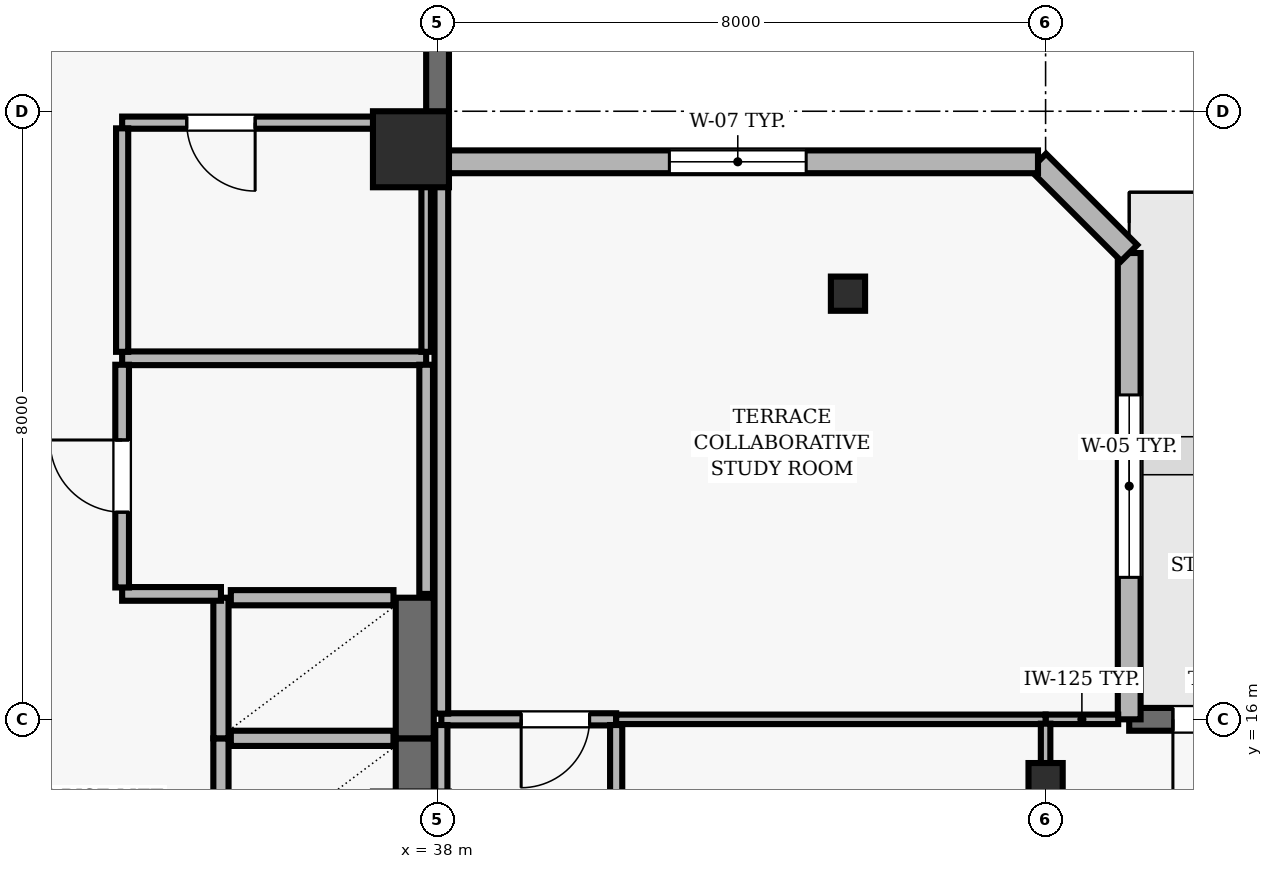
"""IFC4 building model, lengths in metres.
Left out: names, types, materials, properties, quantities, classifications, styles, units other than length and angle.
Written with IfcOpenShell. Run it as: python <this file> out.ifc"""

import sys

from ifc_helpers import new_model, si_unit, direction, frame, frame_2d, origin, origin_2d, place, context, subcontext, project, spatial, rectangle, hollow_rectangle, extrude, element, fill, save


model = new_model("IFC4")
c1 = context("Model", 3, precision=1e-05, world=origin(), true_north=direction((0.0, 1.0)))
c2 = subcontext(c1, "Body", "Model", "MODEL_VIEW")
j1 = project(units=[si_unit("LENGTHUNIT", "METRE"), si_unit("PLANEANGLEUNIT", "RADIAN")], contexts=[c1])
p1 = place(None, origin())
s1 = spatial("IfcSite", under=j1, at=p1, CompositionType="ELEMENT")
p2 = place(p1, origin())
s2 = spatial("IfcBuilding", under=s1, at=p2, CompositionType="ELEMENT")
p3 = place(p2, frame((0.0, 0.0, 195.3)))
s3 = spatial("IfcBuildingStorey", under=s2, at=p3, CompositionType="ELEMENT", Elevation=195.3)
p4 = place(p3, frame((37.65, 23.5, 0.0), z_axis=(0.0, 0.0, 1.0), x_axis=(1.0, 0.0, 0.0)))
e1 = element("IfcColumn", 1, at=p4, inside=s3, PredefinedType="COLUMN", context=c2, shape_type="SweptSolid", body=[
    extrude(rectangle(XDim=1.0, YDim=1.0, at=origin_2d()), origin(), (0.0, 0.0, 1.0), 3.9),
])
for number, where, z_axis, x_axis in (
    (2, (46.0, 15.2, 0.0), (0.0, 0.0, 1.0), (1.0, 0.0, 0.0)),
    (3, (43.4, 21.6, 0.0), (0.0, 0.0, 1.0), (1.0, 0.0, 0.0)),
):
    element("IfcColumn", number, at=place(p3, frame(where, z_axis=z_axis, x_axis=x_axis)), inside=s3, PredefinedType="COLUMN", context=c2, shape_type="SweptSolid", body=[
        extrude(hollow_rectangle(XDim=0.45, YDim=0.45, WallThickness=0.02, at=origin_2d()), origin(), (0.0, 0.0, 1.0), 3.9),
    ])
p5 = place(p3, frame((62.7, 16.0, 0.0), z_axis=(0.0, 0.0, 1.0), x_axis=(-1.0, 0.0, 0.0)))
e4 = element("IfcWall", 4, at=p5, inside=s3, PredefinedType="SOLIDWALL", context=c2, shape_type="SweptSolid", body=[
    extrude(rectangle(XDim=15.6, YDim=0.3, at=frame_2d((7.8, 0.0))), origin(), (0.0, 0.0, 1.0), 3.69),
])
p6 = place(p5, frame((6.475, 0.0, 0.0)))
e5 = element("IfcOpeningElement", 5, at=p6, cuts=e4, PredefinedType="OPENING", context=c2, shape_type="SweptSolid", body=[
    extrude(rectangle(XDim=1.0, YDim=2.2, at=frame_2d((0.5, 1.1))), frame((0.0, 0.16, 0.0), z_axis=(0.0, -1.0, 0.0), x_axis=(1.0, 0.0, 0.0)), (0.0, 0.0, 1.0), 0.32),
])
p7 = place(p5, frame((13.675, 0.0, 0.0)))
e6 = element("IfcOpeningElement", 6, at=p7, cuts=e4, PredefinedType="OPENING", context=c2, shape_type="SweptSolid", body=[
    extrude(rectangle(XDim=1.35, YDim=2.2, at=frame_2d((0.675, 1.1))), frame((0.0, 0.16, 0.0), z_axis=(0.0, -1.0, 0.0), x_axis=(1.0, 0.0, 0.0)), (0.0, 0.0, 1.0), 0.32),
])
p8 = place(p5, frame((10.65, 0.0, 0.9)))
e7 = element("IfcOpeningElement", 7, at=p8, cuts=e4, PredefinedType="OPENING", context=c2, shape_type="SweptSolid", body=[
    extrude(rectangle(XDim=2.1, YDim=1.6, at=frame_2d((1.05, 0.8))), frame((0.0, 0.16, 0.0), z_axis=(0.0, -1.0, 0.0), x_axis=(1.0, 0.0, 0.0)), (0.0, 0.0, 1.0), 0.32),
])
p9 = place(p3, frame((47.1, 16.0, 0.0), z_axis=(0.0, 0.0, 1.0), x_axis=(0.0, 1.0, 0.0)))
e8 = element("IfcWall", 8, at=p9, inside=s3, PredefinedType="SOLIDWALL", context=c2, shape_type="SweptSolid", body=[
    extrude(rectangle(XDim=6.135, YDim=0.3, at=frame_2d((3.067, 0.0))), origin(), (0.0, 0.0, 1.0), 3.69),
])
p10 = place(p9, frame((1.868, 0.0, 0.9)))
e9 = element("IfcOpeningElement", 9, at=p10, cuts=e8, PredefinedType="OPENING", context=c2, shape_type="SweptSolid", body=[
    extrude(rectangle(XDim=2.4, YDim=1.6, at=frame_2d((1.2, 0.8))), frame((0.0, 0.16, 0.0), z_axis=(0.0, -1.0, 0.0), x_axis=(1.0, 0.0, 0.0)), (0.0, 0.0, 1.0), 0.32),
])
p11 = place(p3, frame((47.1, 22.135, 0.0), z_axis=(0.0, 0.0, 1.0), x_axis=(-0.707178703759, 0.707034851297, 0.0)))
e10 = element("IfcWall", 10, at=p11, inside=s3, PredefinedType="SOLIDWALL", context=c2, shape_type="SweptSolid", body=[
    extrude(rectangle(XDim=1.697, YDim=0.3, at=frame_2d((0.849, 0.0))), origin(), (0.0, 0.0, 1.0), 3.69),
])
p12 = place(p3, frame((45.9, 23.335, 0.0), z_axis=(0.0, 0.0, 1.0), x_axis=(-1.0, 0.0, 0.0)))
e11 = element("IfcWall", 11, at=p12, inside=s3, PredefinedType="SOLIDWALL", context=c2, shape_type="SweptSolid", body=[
    extrude(rectangle(XDim=7.9, YDim=0.3, at=frame_2d((3.95, 0.0))), origin(), (0.0, 0.0, 1.0), 3.69),
])
p13 = place(p12, frame((3.05, 0.0, 0.9)))
e12 = element("IfcOpeningElement", 12, at=p13, cuts=e11, PredefinedType="OPENING", context=c2, shape_type="SweptSolid", body=[
    extrude(rectangle(XDim=1.8, YDim=1.8, at=frame_2d((0.9, 0.9))), frame((0.0, 0.16, 0.0), z_axis=(0.0, -1.0, 0.0), x_axis=(1.0, 0.0, 0.0)), (0.0, 0.0, 1.0), 0.32),
])
p14 = place(p3, frame((38.0, 23.335, 0.0), z_axis=(0.0, 0.0, 1.0), x_axis=(0.0, 1.0, 0.0)))
e13 = element("IfcWall", 13, at=p14, inside=s3, PredefinedType="SOLIDWALL", context=c2, shape_type="SweptSolid", body=[
    extrude(rectangle(XDim=17.365, YDim=0.3, at=frame_2d((8.683, 0.0))), origin(), (0.0, 0.0, 1.0), 3.69),
])
p15 = place(p14, frame((8.609, 0.0, 0.0)))
e14 = element("IfcOpeningElement", 14, at=p15, cuts=e13, PredefinedType="OPENING", context=c2, shape_type="SweptSolid", body=[
    extrude(rectangle(XDim=1.0, YDim=2.2, at=frame_2d((0.5, 1.1))), frame((0.0, 0.16, 0.0), z_axis=(0.0, -1.0, 0.0), x_axis=(1.0, 0.0, 0.0)), (0.0, 0.0, 1.0), 0.32),
])
p16 = place(p14, frame((13.271, 0.0, 0.9)))
e15 = element("IfcOpeningElement", 15, at=p16, cuts=e13, PredefinedType="OPENING", context=c2, shape_type="SweptSolid", body=[
    extrude(rectangle(XDim=2.4, YDim=1.8, at=frame_2d((1.2, 0.9))), frame((0.0, 0.16, 0.0), z_axis=(0.0, -1.0, 0.0), x_axis=(1.0, 0.0, 0.0)), (0.0, 0.0, 1.0), 0.32),
])
p17 = place(p3, frame((35.15, 15.75, 0.0), z_axis=(0.0, 0.0, 1.0), x_axis=(0.0, -1.0, 0.0)))
e16 = element("IfcWall", 16, at=p17, inside=s3, PredefinedType="SOLIDWALL", context=c2, shape_type="SweptSolid", body=[
    extrude(rectangle(XDim=1.85, YDim=0.2, at=frame_2d((0.925, 0.0))), origin(), (0.0, 0.0, 1.0), 3.69),
])
p18 = place(p3, frame((37.7, 13.9, 0.0), z_axis=(0.0, 0.0, 1.0), x_axis=(0.0, 1.0, 0.0)))
e17 = element("IfcWall", 17, at=p18, inside=s3, PredefinedType="SHEAR", context=c2, shape_type="SweptSolid", body=[
    extrude(rectangle(XDim=1.85, YDim=0.5, at=frame_2d((0.925, 0.0))), origin(), (0.0, 0.0, 1.0), 3.69),
])
p19 = place(p3, frame((37.42, 15.75, 0.0), z_axis=(0.0, 0.0, 1.0), x_axis=(-1.0, 0.0, 0.0)))
e18 = element("IfcWall", 18, at=p19, inside=s3, PredefinedType="SOLIDWALL", context=c2, shape_type="SweptSolid", body=[
    extrude(rectangle(XDim=2.14, YDim=0.2, at=frame_2d((1.07, 0.0))), origin(), (0.0, 0.0, 1.0), 3.69),
])
p20 = place(p3, frame((35.15, 17.6, 0.0), z_axis=(0.0, 0.0, 1.0), x_axis=(0.0, -1.0, 0.0)))
e19 = element("IfcWall", 19, at=p20, inside=s3, PredefinedType="SOLIDWALL", context=c2, shape_type="SweptSolid", body=[
    extrude(rectangle(XDim=1.85, YDim=0.2, at=frame_2d((0.925, 0.0))), origin(), (0.0, 0.0, 1.0), 3.69),
])
p21 = place(p3, frame((37.7, 15.75, 0.0), z_axis=(0.0, 0.0, 1.0), x_axis=(0.0, 1.0, 0.0)))
e20 = element("IfcWall", 20, at=p21, inside=s3, PredefinedType="SHEAR", context=c2, shape_type="SweptSolid", body=[
    extrude(rectangle(XDim=1.85, YDim=0.5, at=frame_2d((0.925, 0.0))), origin(), (0.0, 0.0, 1.0), 3.69),
])
p22 = place(p3, frame((37.42, 17.6, 0.0), z_axis=(0.0, 0.0, 1.0), x_axis=(-1.0, 0.0, 0.0)))
e21 = element("IfcWall", 21, at=p22, inside=s3, PredefinedType="SOLIDWALL", context=c2, shape_type="SweptSolid", body=[
    extrude(rectangle(XDim=2.14, YDim=0.2, at=frame_2d((1.07, 0.0))), origin(), (0.0, 0.0, 1.0), 3.69),
])
p23 = place(p3, frame((33.85, 17.65, 0.0), z_axis=(0.0, 0.0, 1.0), x_axis=(1.0, 0.0, 0.0)))
e22 = element("IfcWall", 22, at=p23, inside=s3, PredefinedType="PARTITIONING", context=c2, shape_type="SweptSolid", body=[
    extrude(rectangle(XDim=1.3, YDim=0.18, at=frame_2d((0.65, 0.0))), origin(), (0.0, 0.0, 1.0), 3.69),
])
p24 = place(p3, frame((37.85, 20.75, 0.0), z_axis=(0.0, 0.0, 1.0), x_axis=(-1.0, 0.0, 0.0)))
e23 = element("IfcWall", 23, at=p24, inside=s3, PredefinedType="PARTITIONING", context=c2, shape_type="SweptSolid", body=[
    extrude(rectangle(XDim=4.0, YDim=0.18, at=frame_2d((2.0, 0.0))), origin(), (0.0, 0.0, 1.0), 3.69),
])
p25 = place(p3, frame((37.85, 23.85, 0.0), z_axis=(0.0, 0.0, 1.0), x_axis=(-1.0, 0.0, 0.0)))
e24 = element("IfcWall", 24, at=p25, inside=s3, PredefinedType="PARTITIONING", context=c2, shape_type="SweptSolid", body=[
    extrude(rectangle(XDim=4.0, YDim=0.16, at=frame_2d((2.0, 0.0))), origin(), (0.0, 0.0, 1.0), 3.146),
])
p26 = place(p25, frame((2.25, 0.0, 0.0)))
e25 = element("IfcOpeningElement", 25, at=p26, cuts=e24, PredefinedType="OPENING", context=c2, shape_type="SweptSolid", body=[
    extrude(rectangle(XDim=0.9, YDim=2.1, at=frame_2d((0.45, 1.05))), frame((0.0, 0.09, 0.0), z_axis=(0.0, -1.0, 0.0), x_axis=(1.0, 0.0, 0.0)), (0.0, 0.0, 1.0), 0.18),
])
p27 = place(p3, frame((40.35, 16.0, 0.0), z_axis=(0.0, 0.0, 1.0), x_axis=(-1.0, 0.0, 0.0)))
e26 = element("IfcWall", 26, at=p27, inside=s3, PredefinedType="PARTITIONING", context=c2, shape_type="SweptSolid", body=[
    extrude(rectangle(XDim=2.3, YDim=0.16, at=frame_2d((1.15, 0.0))), origin(), (0.0, 0.0, 1.0), 3.69),
])
p28 = place(p27, frame((0.35, 0.0, 0.0)))
e27 = element("IfcOpeningElement", 27, at=p28, cuts=e26, PredefinedType="OPENING", context=c2, shape_type="SweptSolid", body=[
    extrude(rectangle(XDim=0.9, YDim=2.1, at=frame_2d((0.45, 1.05))), frame((0.0, 0.09, 0.0), z_axis=(0.0, -1.0, 0.0), x_axis=(1.0, 0.0, 0.0)), (0.0, 0.0, 1.0), 0.18),
])
p29 = place(p3, frame((46.0, 16.0, 0.0), z_axis=(0.0, 0.0, 1.0), x_axis=(1.0, 0.0, 0.0)))
e28 = element("IfcWall", 28, at=p29, inside=s3, PredefinedType="PARTITIONING", context=c2, shape_type="SweptSolid", body=[
    extrude(rectangle(XDim=0.955, YDim=0.125, at=frame_2d((0.478, 0.0))), origin(), (0.0, 0.0, 1.0), 3.39),
])
p30 = place(p3, frame((46.0, 16.0, 0.0), z_axis=(0.0, 0.0, 1.0), x_axis=(-1.0, 0.0, 0.0)))
e29 = element("IfcWall", 29, at=p30, inside=s3, PredefinedType="PARTITIONING", context=c2, shape_type="SweptSolid", body=[
    extrude(rectangle(XDim=5.65, YDim=0.125, at=frame_2d((2.825, 0.0))), origin(), (0.0, 0.0, 1.0), 3.69),
])
p31 = place(p3, frame((33.85, 17.735, 0.0), z_axis=(0.0, 0.0, 1.0), x_axis=(0.0, 1.0, 0.0)))
e30 = element("IfcWall", 30, at=p31, inside=s3, PredefinedType="PARTITIONING", context=c2, shape_type="SweptSolid", body=[
    extrude(rectangle(XDim=2.93, YDim=0.18, at=frame_2d((1.465, 0.0))), origin(), (0.0, 0.0, 1.0), 3.69),
])
p32 = place(p31, frame((0.99, 0.0, 0.0)))
e31 = element("IfcOpeningElement", 31, at=p32, cuts=e30, PredefinedType="OPENING", context=c2, shape_type="SweptSolid", body=[
    extrude(rectangle(XDim=0.95, YDim=2.1, at=frame_2d((0.475, 1.05))), frame((0.0, 0.1, 0.0), z_axis=(0.0, -1.0, 0.0), x_axis=(1.0, 0.0, 0.0)), (0.0, 0.0, 1.0), 0.2),
])
p33 = place(p3, frame((33.85, 20.835, 0.0), z_axis=(0.0, 0.0, 1.0), x_axis=(0.0, 1.0, 0.0)))
e32 = element("IfcWall", 32, at=p33, inside=s3, PredefinedType="PARTITIONING", context=c2, shape_type="SweptSolid", body=[
    extrude(rectangle(XDim=2.94, YDim=0.16, at=frame_2d((1.47, 0.0))), origin(), (0.0, 0.0, 1.0), 3.69),
])
p34 = place(p3, frame((37.85, 17.65, 0.0), z_axis=(0.0, 0.0, 1.0), x_axis=(0.0, 1.0, 0.0)))
e33 = element("IfcWall", 33, at=p34, inside=s3, PredefinedType="PARTITIONING", context=c2, shape_type="SweptSolid", body=[
    extrude(rectangle(XDim=3.015, YDim=0.18, at=frame_2d((1.508, 0.0))), origin(), (0.0, 0.0, 1.0), 3.146),
])
p35 = place(p3, frame((37.85, 20.835, 0.0), z_axis=(0.0, 0.0, 1.0), x_axis=(0.0, 1.0, 0.0)))
e34 = element("IfcWall", 34, at=p35, inside=s3, PredefinedType="PARTITIONING", context=c2, shape_type="SweptSolid", body=[
    extrude(rectangle(XDim=2.5, YDim=0.125, at=frame_2d((1.25, 0.0))), origin(), (0.0, 0.0, 1.0), 3.146),
])
p36 = place(p3, frame((38.05, 15.925, 0.0), z_axis=(0.0, 0.0, 1.0), x_axis=(0.0, -1.0, 0.0)))
e35 = element("IfcWall", 35, at=p36, inside=s3, PredefinedType="PARTITIONING", context=c2, shape_type="SweptSolid", body=[
    extrude(rectangle(XDim=6.375, YDim=0.16, at=frame_2d((3.188, 0.0))), origin(), (0.0, 0.0, 1.0), 3.146),
])
p37 = place(p3, frame((38.05, 23.19, 0.0), z_axis=(0.0, 0.0, 1.0), x_axis=(0.0, -1.0, 0.0)))
e36 = element("IfcWall", 36, at=p37, inside=s3, PredefinedType="PARTITIONING", context=c2, shape_type="SweptSolid", body=[
    extrude(rectangle(XDim=7.115, YDim=0.18, at=frame_2d((3.558, 0.0))), origin(), (0.0, 0.0, 1.0), 3.146),
])
p38 = place(p3, frame((40.35, 7.625, 0.0), z_axis=(0.0, 0.0, 1.0), x_axis=(0.0, 1.0, 0.0)))
e37 = element("IfcWall", 37, at=p38, inside=s3, PredefinedType="PARTITIONING", context=c2, shape_type="SweptSolid", body=[
    extrude(rectangle(XDim=8.3, YDim=0.16, at=frame_2d((4.15, 0.0))), origin(), (0.0, 0.0, 1.0), 3.372),
])
p39 = place(p38, frame((3.7, 0.0, 0.0)))
e38 = element("IfcOpeningElement", 38, at=p39, cuts=e37, PredefinedType="OPENING", context=c2, shape_type="SweptSolid", body=[
    extrude(rectangle(XDim=0.9, YDim=2.1, at=frame_2d((0.45, 1.05))), frame((0.0, 0.09, 0.0), z_axis=(0.0, -1.0, 0.0), x_axis=(1.0, 0.0, 0.0)), (0.0, 0.0, 1.0), 0.18),
])
p40 = place(p3, frame((46.0, 7.625, 0.0), z_axis=(0.0, 0.0, 1.0), x_axis=(0.0, 1.0, 0.0)))
e39 = element("IfcWall", 39, at=p40, inside=s3, PredefinedType="PARTITIONING", context=c2, shape_type="SweptSolid", body=[
    extrude(rectangle(XDim=8.318, YDim=0.125, at=frame_2d((4.159, 0.0))), origin(), (0.0, 0.0, 1.0), 3.146),
])
p41 = place(p7, origin())
e40 = element("IfcDoor", 40, at=p41, inside=s3, OperationType="SINGLE_SWING_RIGHT", PredefinedType="DOOR", context=c2, shape_type="SweptSolid", body=[
    extrude(rectangle(XDim=1.35, YDim=2.2, at=frame_2d((0.675, 1.1))), frame((0.0, 0.025, 0.0), z_axis=(0.0, -1.0, 0.0), x_axis=(1.0, 0.0, 0.0)), (0.0, 0.0, 1.0), 0.05),
])
fill(e6, e40)
p42 = place(p10, origin())
e41 = element("IfcWindow", 41, at=p42, inside=s3, PartitioningType="SINGLE_PANEL", PredefinedType="WINDOW", context=c2, shape_type="SweptSolid", body=[
    extrude(rectangle(XDim=2.4, YDim=1.6, at=frame_2d((1.2, 0.8))), frame((0.0, 0.03, 0.0), z_axis=(0.0, -1.0, 0.0), x_axis=(1.0, 0.0, 0.0)), (0.0, 0.0, 1.0), 0.06),
])
fill(e9, e41)
p43 = place(p13, origin())
e42 = element("IfcWindow", 42, at=p43, inside=s3, PartitioningType="SINGLE_PANEL", PredefinedType="WINDOW", context=c2, shape_type="SweptSolid", body=[
    extrude(rectangle(XDim=1.8, YDim=1.8, at=frame_2d((0.9, 0.9))), frame((0.0, 0.03, 0.0), z_axis=(0.0, -1.0, 0.0), x_axis=(1.0, 0.0, 0.0)), (0.0, 0.0, 1.0), 0.06),
])
fill(e12, e42)
p44 = place(p32, origin())
e43 = element("IfcDoor", 43, at=p44, inside=s3, OperationType="SINGLE_SWING_RIGHT", PredefinedType="DOOR", context=c2, shape_type="SweptSolid", body=[
    extrude(rectangle(XDim=0.95, YDim=2.1, at=frame_2d((0.475, 1.05))), frame((0.0, 0.025, 0.0), z_axis=(0.0, -1.0, 0.0), x_axis=(1.0, 0.0, 0.0)), (0.0, 0.0, 1.0), 0.05),
])
fill(e31, e43)
p45 = place(p26, origin())
e44 = element("IfcDoor", 44, at=p45, inside=s3, OperationType="SINGLE_SWING_LEFT", PredefinedType="DOOR", context=c2, shape_type="SweptSolid", body=[
    extrude(rectangle(XDim=0.9, YDim=2.1, at=frame_2d((0.45, 1.05))), frame((0.0, 0.025, 0.0), z_axis=(0.0, -1.0, 0.0), x_axis=(1.0, 0.0, 0.0)), (0.0, 0.0, 1.0), 0.05),
])
fill(e25, e44)
p46 = place(p28, origin())
e45 = element("IfcDoor", 45, at=p46, inside=s3, OperationType="SINGLE_SWING_RIGHT", PredefinedType="DOOR", context=c2, shape_type="SweptSolid", body=[
    extrude(rectangle(XDim=0.9, YDim=2.1, at=frame_2d((0.45, 1.05))), frame((0.0, 0.025, 0.0), z_axis=(0.0, -1.0, 0.0), x_axis=(1.0, 0.0, 0.0)), (0.0, 0.0, 1.0), 0.05),
])
fill(e27, e45)
save(model, sys.argv[1])
